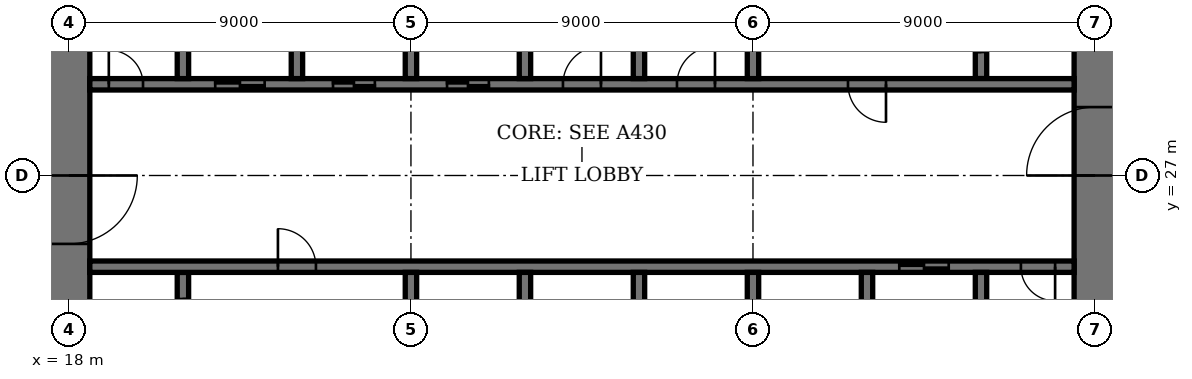
"""IFC4 building model, lengths in metres.
Left out: names, types, materials, properties, quantities, classifications, styles, units other than length and angle.
Written with IfcOpenShell. Run it as: python <this file> out.ifc"""

import sys

from ifc_helpers import new_model, si_unit, direction, frame, frame_2d, origin, place, context, subcontext, project, spatial, rectangle, extrude, element, fill, save


model = new_model("IFC4")
c1 = context("Model", 3, precision=1e-05, world=origin(), true_north=direction((0.0, 1.0)))
c2 = subcontext(c1, "Body", "Model", "MODEL_VIEW")
j1 = project(units=[si_unit("LENGTHUNIT", "METRE"), si_unit("PLANEANGLEUNIT", "RADIAN")], contexts=[c1])
p1 = place(None, origin())
s1 = spatial("IfcSite", under=j1, at=p1, CompositionType="ELEMENT")
p2 = place(p1, origin())
s2 = spatial("IfcBuilding", under=s1, at=p2, CompositionType="ELEMENT")
p3 = place(p2, frame((0.0, 0.0, 214.2)))
s3 = spatial("IfcBuildingStorey", under=s2, at=p3, CompositionType="ELEMENT", Elevation=214.2)
p4 = place(p3, frame((18.0, 35.45, 0.0), z_axis=(0.0, 0.0, 1.0), x_axis=(0.0, -1.0, 0.0)))
e1 = element("IfcWall", 1, at=p4, inside=s3, PredefinedType="SHEAR", context=c2, shape_type="SweptSolid", body=[
    extrude(rectangle(XDim=16.9, YDim=1.1, at=frame_2d((8.45, 0.0))), origin(), (0.0, 0.0, 1.0), 4.0),
])
p5 = place(p4, frame((8.45, 0.0, 0.0)))
e2 = element("IfcOpeningElement", 2, at=p5, cuts=e1, PredefinedType="OPENING", context=c2, shape_type="SweptSolid", body=[
    extrude(rectangle(XDim=1.8, YDim=2.4, at=frame_2d((0.9, 1.2))), frame((0.0, 0.56, 0.0), z_axis=(0.0, -1.0, 0.0), x_axis=(1.0, 0.0, 0.0)), (0.0, 0.0, 1.0), 1.12),
])
p6 = place(p3, frame((45.0, 18.55, 0.0), z_axis=(0.0, 0.0, 1.0), x_axis=(0.0, 1.0, 0.0)))
e3 = element("IfcWall", 3, at=p6, inside=s3, PredefinedType="SHEAR", context=c2, shape_type="SweptSolid", body=[
    extrude(rectangle(XDim=16.9, YDim=1.1, at=frame_2d((8.45, 0.0))), origin(), (0.0, 0.0, 1.0), 4.0),
])
p7 = place(p6, frame((8.45, 0.0, 0.0)))
e4 = element("IfcOpeningElement", 4, at=p7, cuts=e3, PredefinedType="OPENING", context=c2, shape_type="SweptSolid", body=[
    extrude(rectangle(XDim=1.8, YDim=2.4, at=frame_2d((0.9, 1.2))), frame((0.0, 0.56, 0.0), z_axis=(0.0, -1.0, 0.0), x_axis=(1.0, 0.0, 0.0)), (0.0, 0.0, 1.0), 1.12),
])
p8 = place(p3, frame((21.0, 21.95, 0.0), z_axis=(0.0, 0.0, 1.0), x_axis=(0.0, 1.0, 0.0)))
e5 = element("IfcWall", 5, at=p8, inside=s3, PredefinedType="SHEAR", context=c2, shape_type="SweptSolid", body=[
    extrude(rectangle(XDim=2.5, YDim=0.3, at=frame_2d((1.25, 0.0))), origin(), (0.0, 0.0, 1.0), 4.0),
])
p9 = place(p8, frame((0.7, 0.0, 0.0)))
e6 = element("IfcOpeningElement", 6, at=p9, cuts=e5, PredefinedType="OPENING", context=c2, shape_type="SweptSolid", body=[
    extrude(rectangle(XDim=1.1, YDim=2.4, at=frame_2d((0.55, 1.2))), frame((0.0, 0.16, 0.0), z_axis=(0.0, -1.0, 0.0), x_axis=(1.0, 0.0, 0.0)), (0.0, 0.0, 1.0), 0.32),
])
p10 = place(p3, frame((42.0, 29.55, 0.0), z_axis=(0.0, 0.0, 1.0), x_axis=(0.0, 1.0, 0.0)))
e7 = element("IfcWall", 7, at=p10, inside=s3, PredefinedType="SHEAR", context=c2, shape_type="SweptSolid", body=[
    extrude(rectangle(XDim=2.5, YDim=0.3, at=frame_2d((1.25, 0.0))), origin(), (0.0, 0.0, 1.0), 4.0),
])
p11 = place(p10, frame((0.7, 0.0, 0.0)))
e8 = element("IfcOpeningElement", 8, at=p11, cuts=e7, PredefinedType="OPENING", context=c2, shape_type="SweptSolid", body=[
    extrude(rectangle(XDim=1.1, YDim=2.4, at=frame_2d((0.55, 1.2))), frame((0.0, 0.16, 0.0), z_axis=(0.0, -1.0, 0.0), x_axis=(1.0, 0.0, 0.0)), (0.0, 0.0, 1.0), 0.32),
])
p12 = place(p3, frame((18.55, 24.6, 0.0), z_axis=(0.0, 0.0, 1.0), x_axis=(1.0, 0.0, 0.0)))
e9 = element("IfcWall", 9, at=p12, inside=s3, PredefinedType="SHEAR", context=c2, shape_type="SweptSolid", body=[
    extrude(rectangle(XDim=25.9, YDim=0.3, at=frame_2d((12.95, 0.0))), origin(), (0.0, 0.0, 1.0), 4.0),
])
p13 = place(p12, frame((4.95, 0.0, 0.0)))
e10 = element("IfcOpeningElement", 10, at=p13, cuts=e9, PredefinedType="OPENING", context=c2, shape_type="SweptSolid", body=[
    extrude(rectangle(XDim=1.0, YDim=2.4, at=frame_2d((0.5, 1.2))), frame((0.0, 0.16, 0.0), z_axis=(0.0, -1.0, 0.0), x_axis=(1.0, 0.0, 0.0)), (0.0, 0.0, 1.0), 0.32),
])
p14 = place(p12, frame((24.5, 0.0, 0.0)))
e11 = element("IfcOpeningElement", 11, at=p14, cuts=e9, PredefinedType="OPENING", context=c2, shape_type="SweptSolid", body=[
    extrude(rectangle(XDim=0.9, YDim=2.1, at=frame_2d((0.45, 1.05))), frame((0.0, 0.16, 0.0), z_axis=(0.0, -1.0, 0.0), x_axis=(1.0, 0.0, 0.0)), (0.0, 0.0, 1.0), 0.32),
])
p15 = place(p12, frame((21.3, 0.0, 0.0)))
e12 = element("IfcOpeningElement", 12, at=p15, cuts=e9, PredefinedType="OPENING", context=c2, shape_type="SweptSolid", body=[
    extrude(rectangle(XDim=1.3, YDim=2.4, at=frame_2d((0.65, 1.2))), frame((0.0, 0.16, 0.0), z_axis=(0.0, -1.0, 0.0), x_axis=(1.0, 0.0, 0.0)), (0.0, 0.0, 1.0), 0.32),
])
p16 = place(p3, frame((18.55, 29.4, 0.0), z_axis=(0.0, 0.0, 1.0), x_axis=(1.0, 0.0, 0.0)))
e13 = element("IfcWall", 13, at=p16, inside=s3, PredefinedType="SHEAR", context=c2, shape_type="SweptSolid", body=[
    extrude(rectangle(XDim=25.9, YDim=0.3, at=frame_2d((12.95, 0.0))), origin(), (0.0, 0.0, 1.0), 4.0),
])
p17 = place(p16, frame((19.95, 0.0, 0.0)))
e14 = element("IfcOpeningElement", 14, at=p17, cuts=e13, PredefinedType="OPENING", context=c2, shape_type="SweptSolid", body=[
    extrude(rectangle(XDim=1.0, YDim=2.4, at=frame_2d((0.5, 1.2))), frame((0.0, 0.16, 0.0), z_axis=(0.0, -1.0, 0.0), x_axis=(1.0, 0.0, 0.0)), (0.0, 0.0, 1.0), 0.32),
])
p18 = place(p16, frame((0.5, 0.0, 0.0)))
e15 = element("IfcOpeningElement", 15, at=p18, cuts=e13, PredefinedType="OPENING", context=c2, shape_type="SweptSolid", body=[
    extrude(rectangle(XDim=0.9, YDim=2.1, at=frame_2d((0.45, 1.05))), frame((0.0, 0.16, 0.0), z_axis=(0.0, -1.0, 0.0), x_axis=(1.0, 0.0, 0.0)), (0.0, 0.0, 1.0), 0.32),
])
p19 = place(p16, frame((15.45, 0.0, 0.0)))
e16 = element("IfcOpeningElement", 16, at=p19, cuts=e13, PredefinedType="OPENING", context=c2, shape_type="SweptSolid", body=[
    extrude(rectangle(XDim=1.0, YDim=2.4, at=frame_2d((0.5, 1.2))), frame((0.0, 0.16, 0.0), z_axis=(0.0, -1.0, 0.0), x_axis=(1.0, 0.0, 0.0)), (0.0, 0.0, 1.0), 0.32),
])
p20 = place(p16, frame((12.45, 0.0, 0.0)))
e17 = element("IfcOpeningElement", 17, at=p20, cuts=e13, PredefinedType="OPENING", context=c2, shape_type="SweptSolid", body=[
    extrude(rectangle(XDim=1.0, YDim=2.4, at=frame_2d((0.5, 1.2))), frame((0.0, 0.16, 0.0), z_axis=(0.0, -1.0, 0.0), x_axis=(1.0, 0.0, 0.0)), (0.0, 0.0, 1.0), 0.32),
])
p21 = place(p16, frame((9.4, 0.0, 0.0)))
e18 = element("IfcOpeningElement", 18, at=p21, cuts=e13, PredefinedType="OPENING", context=c2, shape_type="SweptSolid", body=[
    extrude(rectangle(XDim=1.1, YDim=2.4, at=frame_2d((0.55, 1.2))), frame((0.0, 0.16, 0.0), z_axis=(0.0, -1.0, 0.0), x_axis=(1.0, 0.0, 0.0)), (0.0, 0.0, 1.0), 0.32),
])
p22 = place(p16, frame((6.4, 0.0, 0.0)))
e19 = element("IfcOpeningElement", 19, at=p22, cuts=e13, PredefinedType="OPENING", context=c2, shape_type="SweptSolid", body=[
    extrude(rectangle(XDim=1.1, YDim=2.4, at=frame_2d((0.55, 1.2))), frame((0.0, 0.16, 0.0), z_axis=(0.0, -1.0, 0.0), x_axis=(1.0, 0.0, 0.0)), (0.0, 0.0, 1.0), 0.32),
])
p23 = place(p16, frame((3.3, 0.0, 0.0)))
e20 = element("IfcOpeningElement", 20, at=p23, cuts=e13, PredefinedType="OPENING", context=c2, shape_type="SweptSolid", body=[
    extrude(rectangle(XDim=1.3, YDim=2.4, at=frame_2d((0.65, 1.2))), frame((0.0, 0.16, 0.0), z_axis=(0.0, -1.0, 0.0), x_axis=(1.0, 0.0, 0.0)), (0.0, 0.0, 1.0), 0.32),
])
for number, where, z_axis, x_axis in (
    (21, (30.0, 21.75, 0.0), (0.0, 0.0, 1.0), (0.0, 1.0, 0.0)),
    (22, (33.0, 29.55, 0.0), (0.0, 0.0, 1.0), (0.0, 1.0, 0.0)),
    (23, (33.0, 21.75, 0.0), (0.0, 0.0, 1.0), (0.0, 1.0, 0.0)),
    (24, (30.0, 29.55, 0.0), (0.0, 0.0, 1.0), (0.0, 1.0, 0.0)),
    (25, (36.0, 21.75, 0.0), (0.0, 0.0, 1.0), (0.0, 1.0, 0.0)),
    (26, (27.0, 29.55, 0.0), (0.0, 0.0, 1.0), (0.0, 1.0, 0.0)),
):
    element("IfcWall", number, at=place(p3, frame(where, z_axis=z_axis, x_axis=x_axis)), inside=s3, PredefinedType="SHEAR", context=c2, shape_type="SweptSolid", body=[
        extrude(rectangle(XDim=2.7, YDim=0.3, at=frame_2d((1.35, 0.0))), origin(), (0.0, 0.0, 1.0), 4.0),
    ])
for number, where, z_axis, x_axis in (
    (27, (39.0, 18.55, 0.0), (0.0, 0.0, 1.0), (0.0, 1.0, 0.0)),
    (28, (24.0, 29.55, 0.0), (0.0, 0.0, 1.0), (0.0, 1.0, 0.0)),
):
    element("IfcWall", number, at=place(p3, frame(where, z_axis=z_axis, x_axis=x_axis)), inside=s3, PredefinedType="SHEAR", context=c2, shape_type="SweptSolid", body=[
        extrude(rectangle(XDim=5.9, YDim=0.3, at=frame_2d((2.95, 0.0))), origin(), (0.0, 0.0, 1.0), 4.0),
    ])
for number, where, z_axis, x_axis in (
    (29, (42.0, 21.75, 0.0), (0.0, 0.0, 1.0), (0.0, 1.0, 0.0)),
    (30, (21.0, 29.55, 0.0), (0.0, 0.0, 1.0), (0.0, 1.0, 0.0)),
):
    element("IfcWall", number, at=place(p3, frame(where, z_axis=z_axis, x_axis=x_axis)), inside=s3, PredefinedType="SHEAR", context=c2, shape_type="SweptSolid", body=[
        extrude(rectangle(XDim=2.7, YDim=0.3, at=frame_2d((1.35, 0.0))), origin(), (0.0, 0.0, 1.0), 4.0),
    ])
for number, where, z_axis, x_axis in (
    (31, (27.0, 21.6, 0.0), (0.0, 0.0, 1.0), (0.0, 1.0, 0.0)),
    (32, (36.0, 29.55, 0.0), (0.0, 0.0, 1.0), (0.0, 1.0, 0.0)),
):
    element("IfcWall", number, at=place(p3, frame(where, z_axis=z_axis, x_axis=x_axis)), inside=s3, PredefinedType="SHEAR", context=c2, shape_type="SweptSolid", body=[
        extrude(rectangle(XDim=2.85, YDim=0.3, at=frame_2d((1.425, 0.0))), origin(), (0.0, 0.0, 1.0), 4.0),
    ])
p24 = place(p5, origin())
e33 = element("IfcDoor", 33, at=p24, inside=s3, OperationType="DOUBLE_DOOR_DOUBLE_SWING", PredefinedType="DOOR", context=c2, shape_type="SweptSolid", body=[
    extrude(rectangle(XDim=1.8, YDim=2.4, at=frame_2d((0.9, 1.2))), frame((0.0, 0.03, 0.0), z_axis=(0.0, -1.0, 0.0), x_axis=(1.0, 0.0, 0.0)), (0.0, 0.0, 1.0), 0.06),
    extrude(rectangle(XDim=0.04, YDim=2.4, at=frame_2d((0.02, 1.2))), frame((0.0, 0.55, 0.0), z_axis=(0.0, -1.0, 0.0), x_axis=(1.0, 0.0, 0.0)), (0.0, 0.0, 1.0), 1.1),
    extrude(rectangle(XDim=0.04, YDim=2.4, at=frame_2d((1.78, 1.2))), frame((0.0, 0.55, 0.0), z_axis=(0.0, -1.0, 0.0), x_axis=(1.0, 0.0, 0.0)), (0.0, 0.0, 1.0), 1.1),
    extrude(rectangle(XDim=1.8, YDim=0.04, at=frame_2d((0.9, 2.38))), frame((0.0, 0.55, 0.0), z_axis=(0.0, -1.0, 0.0), x_axis=(1.0, 0.0, 0.0)), (0.0, 0.0, 1.0), 1.1),
])
fill(e2, e33)
p25 = place(p7, origin())
e34 = element("IfcDoor", 34, at=p25, inside=s3, OperationType="DOUBLE_DOOR_DOUBLE_SWING", PredefinedType="DOOR", context=c2, shape_type="SweptSolid", body=[
    extrude(rectangle(XDim=1.8, YDim=2.4, at=frame_2d((0.9, 1.2))), frame((0.0, 0.03, 0.0), z_axis=(0.0, -1.0, 0.0), x_axis=(1.0, 0.0, 0.0)), (0.0, 0.0, 1.0), 0.06),
    extrude(rectangle(XDim=0.04, YDim=2.4, at=frame_2d((0.02, 1.2))), frame((0.0, 0.55, 0.0), z_axis=(0.0, -1.0, 0.0), x_axis=(1.0, 0.0, 0.0)), (0.0, 0.0, 1.0), 1.1),
    extrude(rectangle(XDim=0.04, YDim=2.4, at=frame_2d((1.78, 1.2))), frame((0.0, 0.55, 0.0), z_axis=(0.0, -1.0, 0.0), x_axis=(1.0, 0.0, 0.0)), (0.0, 0.0, 1.0), 1.1),
    extrude(rectangle(XDim=1.8, YDim=0.04, at=frame_2d((0.9, 2.38))), frame((0.0, 0.55, 0.0), z_axis=(0.0, -1.0, 0.0), x_axis=(1.0, 0.0, 0.0)), (0.0, 0.0, 1.0), 1.1),
])
fill(e4, e34)
p26 = place(p13, origin())
e35 = element("IfcDoor", 35, at=p26, inside=s3, OperationType="SINGLE_SWING_RIGHT", PredefinedType="DOOR", context=c2, shape_type="SweptSolid", body=[
    extrude(rectangle(XDim=1.0, YDim=2.4, at=frame_2d((0.5, 1.2))), frame((0.0, 0.03, 0.0), z_axis=(0.0, -1.0, 0.0), x_axis=(1.0, 0.0, 0.0)), (0.0, 0.0, 1.0), 0.06),
])
fill(e10, e35)
p27 = place(p17, origin())
e36 = element("IfcDoor", 36, at=p27, inside=s3, OperationType="SINGLE_SWING_RIGHT", PredefinedType="DOOR", context=c2, shape_type="SweptSolid", body=[
    extrude(rectangle(XDim=1.0, YDim=2.4, at=frame_2d((0.5, 1.2))), frame((0.0, 0.03, 0.0), z_axis=(0.0, -1.0, 0.0), x_axis=(1.0, 0.0, 0.0)), (0.0, 0.0, 1.0), 0.06),
])
fill(e14, e36)
p28 = place(p14, origin())
e37 = element("IfcDoor", 37, at=p28, inside=s3, OperationType="SINGLE_SWING_RIGHT", PredefinedType="DOOR", context=c2, shape_type="SweptSolid", body=[
    extrude(rectangle(XDim=0.9, YDim=2.1, at=frame_2d((0.45, 1.05))), frame((0.0, 0.03, 0.0), z_axis=(0.0, -1.0, 0.0), x_axis=(1.0, 0.0, 0.0)), (0.0, 0.0, 1.0), 0.06),
])
fill(e11, e37)
p29 = place(p18, origin())
e38 = element("IfcDoor", 38, at=p29, inside=s3, OperationType="SINGLE_SWING_RIGHT", PredefinedType="DOOR", context=c2, shape_type="SweptSolid", body=[
    extrude(rectangle(XDim=0.9, YDim=2.1, at=frame_2d((0.45, 1.05))), frame((0.0, 0.03, 0.0), z_axis=(0.0, -1.0, 0.0), x_axis=(1.0, 0.0, 0.0)), (0.0, 0.0, 1.0), 0.06),
])
fill(e15, e38)
p30 = place(p19, origin())
e39 = element("IfcDoor", 39, at=p30, inside=s3, OperationType="SINGLE_SWING_LEFT", PredefinedType="DOOR", context=c2, shape_type="SweptSolid", body=[
    extrude(rectangle(XDim=1.0, YDim=2.4, at=frame_2d((0.5, 1.2))), frame((0.0, 0.03, 0.0), z_axis=(0.0, -1.0, 0.0), x_axis=(1.0, 0.0, 0.0)), (0.0, 0.0, 1.0), 0.06),
])
fill(e16, e39)
p31 = place(p20, origin())
e40 = element("IfcDoor", 40, at=p31, inside=s3, OperationType="SINGLE_SWING_LEFT", PredefinedType="DOOR", context=c2, shape_type="SweptSolid", body=[
    extrude(rectangle(XDim=1.0, YDim=2.4, at=frame_2d((0.5, 1.2))), frame((0.0, 0.03, 0.0), z_axis=(0.0, -1.0, 0.0), x_axis=(1.0, 0.0, 0.0)), (0.0, 0.0, 1.0), 0.06),
])
fill(e17, e40)
p32 = place(p21, origin())
e41 = element("IfcDoor", 41, at=p32, inside=s3, OperationType="DOUBLE_DOOR_SLIDING", PredefinedType="DOOR", context=c2, shape_type="SweptSolid", body=[
    extrude(rectangle(XDim=1.1, YDim=2.4, at=frame_2d((0.55, 1.2))), frame((0.0, 0.02, 0.0), z_axis=(0.0, -1.0, 0.0), x_axis=(1.0, 0.0, 0.0)), (0.0, 0.0, 1.0), 0.04),
])
fill(e18, e41)
p33 = place(p22, origin())
e42 = element("IfcDoor", 42, at=p33, inside=s3, OperationType="DOUBLE_DOOR_SLIDING", PredefinedType="DOOR", context=c2, shape_type="SweptSolid", body=[
    extrude(rectangle(XDim=1.1, YDim=2.4, at=frame_2d((0.55, 1.2))), frame((0.0, 0.02, 0.0), z_axis=(0.0, -1.0, 0.0), x_axis=(1.0, 0.0, 0.0)), (0.0, 0.0, 1.0), 0.04),
])
fill(e19, e42)
p34 = place(p15, origin())
e43 = element("IfcDoor", 43, at=p34, inside=s3, OperationType="DOUBLE_DOOR_SLIDING", PredefinedType="DOOR", context=c2, shape_type="SweptSolid", body=[
    extrude(rectangle(XDim=1.3, YDim=2.4, at=frame_2d((0.65, 1.2))), frame((0.0, 0.02, 0.0), z_axis=(0.0, -1.0, 0.0), x_axis=(1.0, 0.0, 0.0)), (0.0, 0.0, 1.0), 0.04),
])
fill(e12, e43)
p35 = place(p23, origin())
e44 = element("IfcDoor", 44, at=p35, inside=s3, OperationType="DOUBLE_DOOR_SLIDING", PredefinedType="DOOR", context=c2, shape_type="SweptSolid", body=[
    extrude(rectangle(XDim=1.3, YDim=2.4, at=frame_2d((0.65, 1.2))), frame((0.0, 0.02, 0.0), z_axis=(0.0, -1.0, 0.0), x_axis=(1.0, 0.0, 0.0)), (0.0, 0.0, 1.0), 0.04),
])
fill(e20, e44)
save(model, sys.argv[1])
